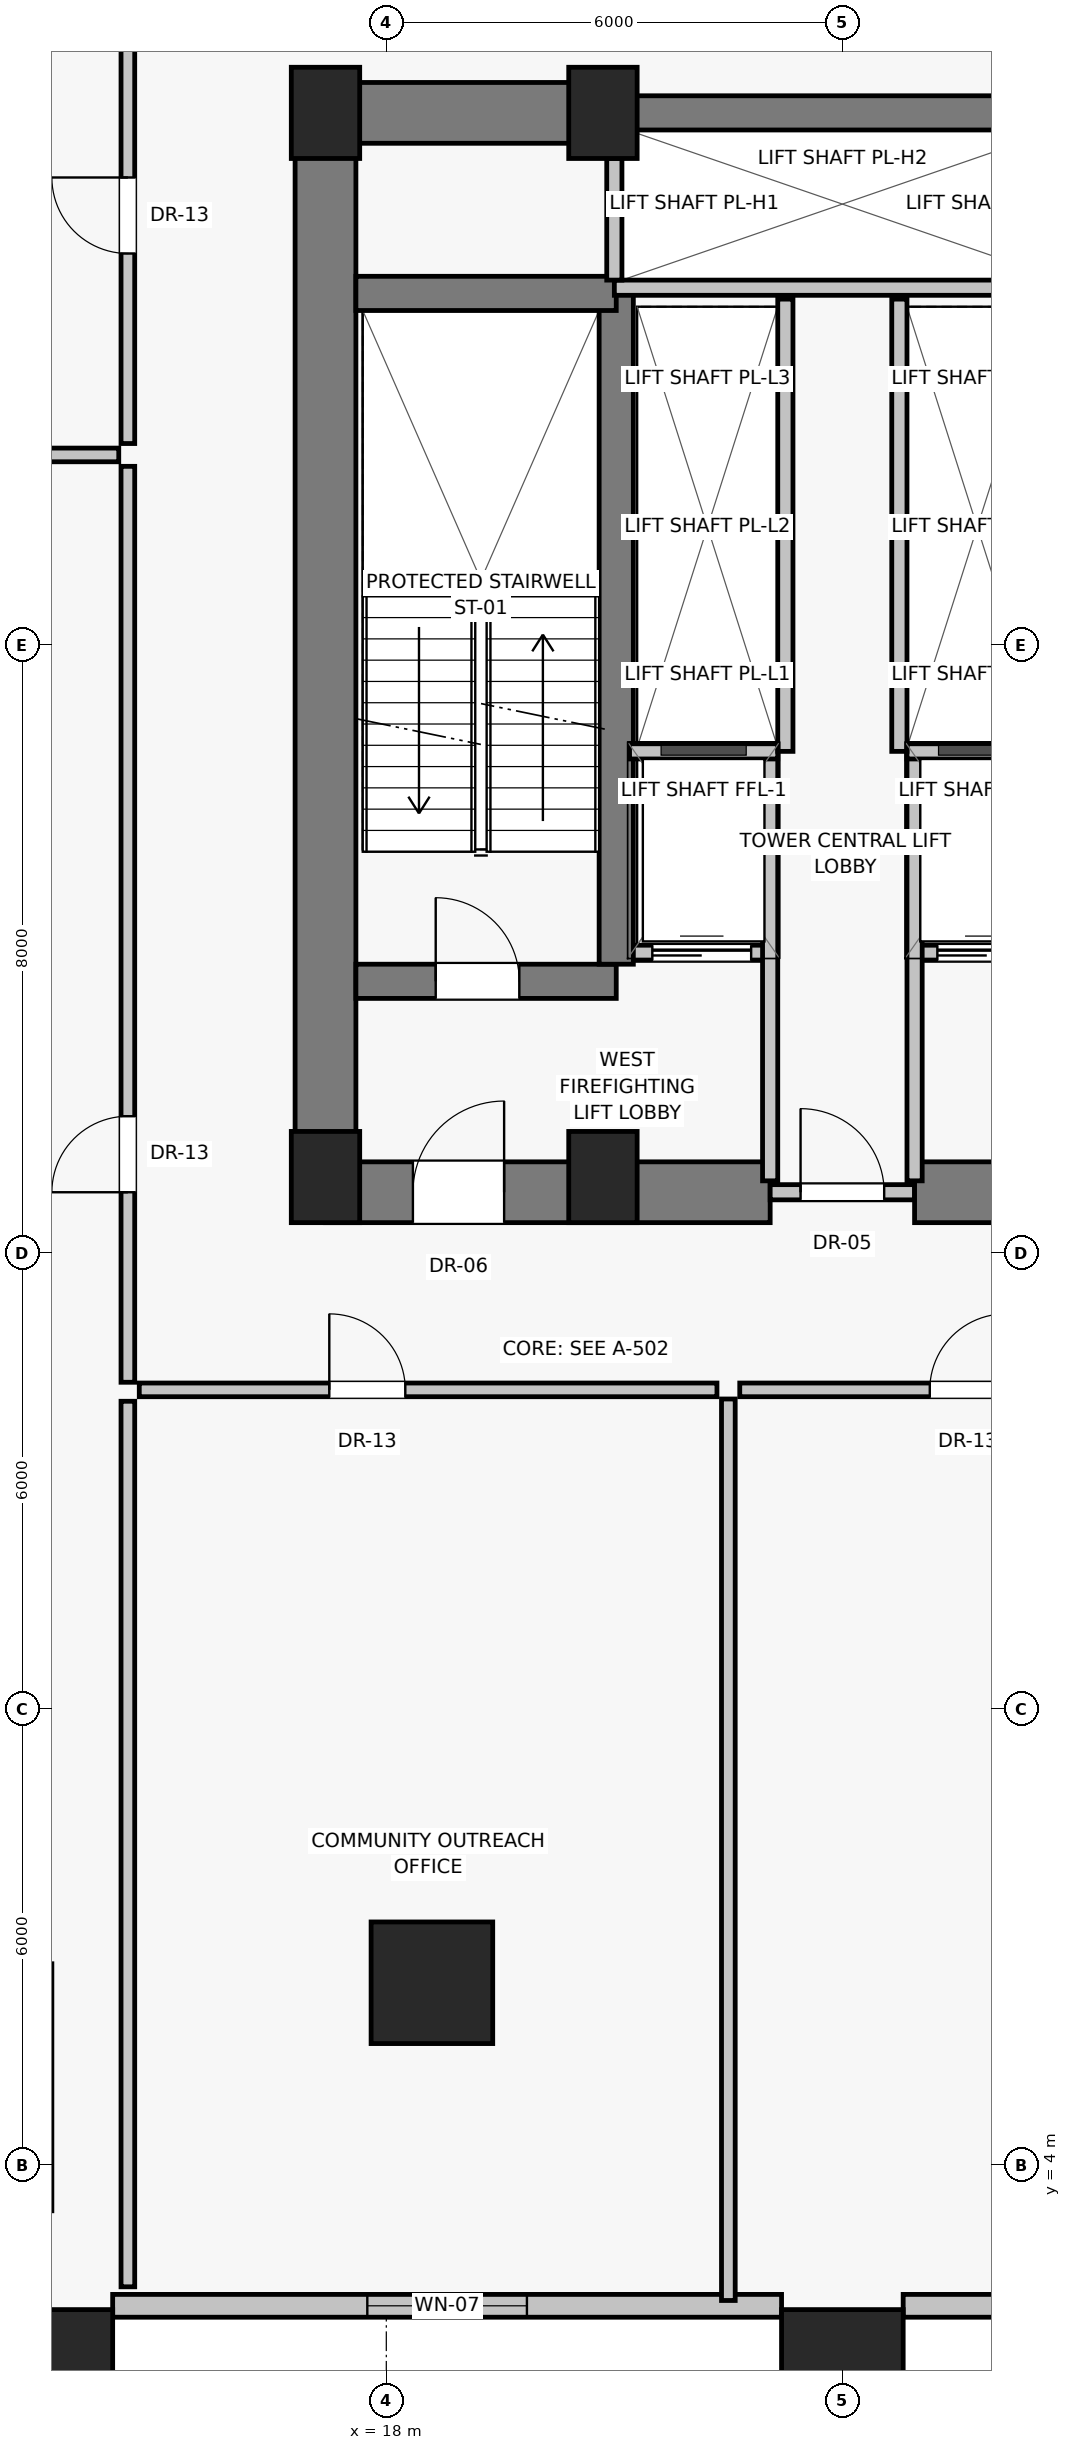
"""IFC4 building model, lengths in metres.
Left out: names, types, materials, properties, quantities, classifications, styles, units other than length and angle.
Written with IfcOpenShell. Run it as: python <this file> out.ifc"""

import sys

from ifc_helpers import new_model, si_unit, direction, frame, frame_2d, origin, origin_2d, place, context, subcontext, project, spatial, rectangle, extrude, source, transform, mapped, element, fill, save


model = new_model("IFC4")
c1 = context("Model", 3, precision=1e-05, world=origin(), true_north=direction((0.0, 1.0)))
c2 = subcontext(c1, "Body", "Model", "MODEL_VIEW")
j1 = project(units=[si_unit("LENGTHUNIT", "METRE"), si_unit("PLANEANGLEUNIT", "RADIAN")], contexts=[c1])
p1 = place(None, origin())
s1 = spatial("IfcSite", under=j1, at=p1, CompositionType="ELEMENT")
p2 = place(p1, origin())
s2 = spatial("IfcBuilding", under=s1, at=p2, CompositionType="ELEMENT")
p3 = place(p2, frame((0.0, 0.0, 14.0)))
s3 = spatial("IfcBuildingStorey", under=s2, at=p3, CompositionType="ELEMENT", Elevation=14.0)
for number, where, z_axis, x_axis in (
    (1, (17.2, 17.0, 0.0), (0.0, 0.0, 1.0), (1.0, 0.0, 0.0)),
    (2, (20.85, 17.0, 0.0), (0.0, 0.0, 1.0), (1.0, 0.0, 0.0)),
    (3, (17.2, 31.0, 0.0), (0.0, 0.0, 1.0), (1.0, 0.0, 0.0)),
    (4, (20.85, 31.0, 0.0), (0.0, 0.0, 1.0), (1.0, 0.0, 0.0)),
):
    element("IfcColumn", number, at=place(p3, frame(where, z_axis=z_axis, x_axis=x_axis)), inside=s3, PredefinedType="PILASTER", context=c2, shape_type="SweptSolid", body=[
        extrude(rectangle(XDim=0.9, YDim=1.2, at=origin_2d()), origin(), (0.0, 0.0, 1.0), 4.4),
    ])
for number, where, z_axis, x_axis in (
    (5, (13.6, 1.3, 0.0), (0.0, 0.0, 1.0), (1.0, 0.0, 0.0)),
    (6, (24.0, 1.3, 0.0), (0.0, 0.0, 1.0), (1.0, 0.0, 0.0)),
    (7, (18.6, 6.4, 0.0), (0.0, 0.0, 1.0), (1.0, 0.0, 0.0)),
):
    element("IfcColumn", number, at=place(p3, frame(where, z_axis=z_axis, x_axis=x_axis)), inside=s3, PredefinedType="COLUMN", context=c2, shape_type="SweptSolid", body=[
        extrude(rectangle(XDim=1.6, YDim=1.6, at=origin_2d()), origin(), (0.0, 0.0, 1.0), 4.4),
    ])
p4 = place(p3, frame((14.4, 2.15, 0.0), z_axis=(0.0, 0.0, 1.0), x_axis=(1.0, 0.0, 0.0)))
e8 = element("IfcWall", 8, at=p4, inside=s3, PredefinedType="SOLIDWALL", context=c2, shape_type="SweptSolid", body=[
    extrude(rectangle(XDim=8.8, YDim=0.3, at=frame_2d((4.4, 0.0))), origin(), (0.0, 0.0, 1.0), 3.0),
])
p5 = place(p4, frame((3.35, 0.0, 0.85)))
e9 = element("IfcOpeningElement", 9, at=p5, cuts=e8, PredefinedType="OPENING", context=c2, shape_type="SweptSolid", body=[
    extrude(rectangle(XDim=2.1, YDim=1.75, at=frame_2d((1.05, 0.875))), frame((0.0, 0.16, 0.0), z_axis=(0.0, -1.0, 0.0), x_axis=(1.0, 0.0, 0.0)), (0.0, 0.0, 1.0), 0.32),
])
p6 = place(p3, frame((24.8, 2.15, 0.0), z_axis=(0.0, 0.0, 1.0), x_axis=(1.0, 0.0, 0.0)))
e10 = element("IfcWall", 10, at=p6, inside=s3, PredefinedType="SOLIDWALL", context=c2, shape_type="SweptSolid", body=[
    extrude(rectangle(XDim=8.8, YDim=0.3, at=frame_2d((4.4, 0.0))), origin(), (0.0, 0.0, 1.0), 3.0),
])
p7 = place(p6, frame((3.35, 0.0, 0.85)))
e11 = element("IfcOpeningElement", 11, at=p7, cuts=e10, PredefinedType="OPENING", context=c2, shape_type="SweptSolid", body=[
    extrude(rectangle(XDim=2.1, YDim=1.75, at=frame_2d((1.05, 0.875))), frame((0.0, 0.16, 0.0), z_axis=(0.0, -1.0, 0.0), x_axis=(1.0, 0.0, 0.0)), (0.0, 0.0, 1.0), 0.32),
])
p8 = place(p3, frame((17.2, 16.8, 0.0), z_axis=(0.0, 0.0, 1.0), x_axis=(0.0, 1.0, 0.0)))
e12 = element("IfcWall", 12, at=p8, inside=s3, PredefinedType="SHEAR", context=c2, shape_type="SweptSolid", body=[
    extrude(rectangle(XDim=14.2, YDim=0.8, at=frame_2d((7.1, 0.0))), origin(), (0.0, 0.0, 1.0), 4.1),
])
p9 = place(p3, frame((17.2, 16.8, 0.0), z_axis=(0.0, 0.0, 1.0), x_axis=(1.0, 0.0, 0.0)))
e13 = element("IfcWall", 13, at=p9, inside=s3, PredefinedType="SHEAR", context=c2, shape_type="SweptSolid", body=[
    extrude(rectangle(XDim=5.85, YDim=0.8, at=frame_2d((2.925, 0.0))), origin(), (0.0, 0.0, 1.0), 4.1),
])
p10 = place(p9, frame((1.15, 0.0, 0.0)))
e14 = element("IfcOpeningElement", 14, at=p10, cuts=e13, PredefinedType="OPENING", context=c2, shape_type="SweptSolid", body=[
    extrude(rectangle(XDim=1.2, YDim=2.03, at=frame_2d((0.6, 1.015))), frame((0.0, 0.41, 0.0), z_axis=(0.0, -1.0, 0.0), x_axis=(1.0, 0.0, 0.0)), (0.0, 0.0, 1.0), 0.82),
])
p11 = place(p3, frame((23.05, 16.8, 0.0), z_axis=(0.0, 0.0, 1.0), x_axis=(1.0, 0.0, 0.0)))
e15 = element("IfcWall", 15, at=p11, inside=s3, PredefinedType="SOLIDWALL", context=c2, shape_type="SweptSolid", body=[
    extrude(rectangle(XDim=1.9, YDim=0.2, at=frame_2d((0.95, 0.0))), origin(), (0.0, 0.0, 1.0), 3.25),
])
p12 = place(p11, frame((0.4, 0.0, 0.0)))
e16 = element("IfcOpeningElement", 16, at=p12, cuts=e15, PredefinedType="OPENING", context=c2, shape_type="SweptSolid", body=[
    extrude(rectangle(XDim=1.1, YDim=2.03, at=frame_2d((0.55, 1.015))), frame((0.0, 0.11, 0.0), z_axis=(0.0, -1.0, 0.0), x_axis=(1.0, 0.0, 0.0)), (0.0, 0.0, 1.0), 0.22),
])
p13 = place(p3, frame((24.95, 16.8, 0.0), z_axis=(0.0, 0.0, 1.0), x_axis=(1.0, 0.0, 0.0)))
e17 = element("IfcWall", 17, at=p13, inside=s3, PredefinedType="SHEAR", context=c2, shape_type="SweptSolid", body=[
    extrude(rectangle(XDim=5.85, YDim=0.8, at=frame_2d((2.925, 0.0))), origin(), (0.0, 0.0, 1.0), 4.1),
])
p14 = place(p13, frame((2.15, 0.0, 0.0)))
e18 = element("IfcOpeningElement", 18, at=p14, cuts=e17, PredefinedType="OPENING", context=c2, shape_type="SweptSolid", body=[
    extrude(rectangle(XDim=1.2, YDim=2.03, at=frame_2d((0.6, 1.015))), frame((0.0, 0.41, 0.0), z_axis=(0.0, -1.0, 0.0), x_axis=(1.0, 0.0, 0.0)), (0.0, 0.0, 1.0), 0.82),
])
p15 = place(p3, frame((17.2, 31.0, 0.0), z_axis=(0.0, 0.0, 1.0), x_axis=(1.0, 0.0, 0.0)))
e19 = element("IfcWall", 19, at=p15, inside=s3, PredefinedType="SHEAR", context=c2, shape_type="SweptSolid", body=[
    extrude(rectangle(XDim=3.8, YDim=0.8, at=frame_2d((1.9, 0.0))), origin(), (0.0, 0.0, 1.0), 4.1),
])
p16 = place(p3, frame((21.0, 31.0, 0.0), z_axis=(0.0, 0.0, 1.0), x_axis=(1.0, 0.0, 0.0)))
e20 = element("IfcWall", 20, at=p16, inside=s3, PredefinedType="SHEAR", context=c2, shape_type="SweptSolid", body=[
    extrude(rectangle(XDim=6.0, YDim=0.45, at=frame_2d((3.0, 0.0))), origin(), (0.0, 0.0, 1.0), 4.1),
])
p17 = place(p3, frame((17.6, 19.575, 0.0), z_axis=(0.0, 0.0, 1.0), x_axis=(1.0, 0.0, 0.0)))
e21 = element("IfcWall", 21, at=p17, inside=s3, PredefinedType="SHEAR", context=c2, shape_type="SweptSolid", body=[
    extrude(rectangle(XDim=3.425, YDim=0.45, at=frame_2d((1.712, 0.0))), origin(), (0.0, 0.0, 1.0), 4.1),
])
p18 = place(p17, frame((1.05, 0.0, 0.0)))
e22 = element("IfcOpeningElement", 22, at=p18, cuts=e21, PredefinedType="OPENING", context=c2, shape_type="SweptSolid", body=[
    extrude(rectangle(XDim=1.1, YDim=2.03, at=frame_2d((0.55, 1.015))), frame((0.0, 0.235, 0.0), z_axis=(0.0, -1.0, 0.0), x_axis=(1.0, 0.0, 0.0)), (0.0, 0.0, 1.0), 0.47),
])
p19 = place(p3, frame((21.2, 19.95, 0.0), z_axis=(0.0, 0.0, 1.0), x_axis=(1.0, 0.0, 0.0)))
e23 = element("IfcWall", 23, at=p19, inside=s3, PredefinedType="SOLIDWALL", context=c2, shape_type="SweptSolid", body=[
    extrude(rectangle(XDim=1.85, YDim=0.2, at=frame_2d((0.925, 0.0))), origin(), (0.0, 0.0, 1.0), 4.1),
])
p20 = place(p19, frame((0.3, 0.0, 0.0)))
e24 = element("IfcOpeningElement", 24, at=p20, cuts=e23, PredefinedType="OPENING", context=c2, shape_type="SweptSolid", body=[
    extrude(rectangle(XDim=1.3, YDim=2.25, at=frame_2d((0.65, 1.125))), frame((0.0, 0.11, 0.0), z_axis=(0.0, -1.0, 0.0), x_axis=(1.0, 0.0, 0.0)), (0.0, 0.0, 1.0), 0.22),
])
p21 = place(p3, frame((24.95, 19.95, 0.0), z_axis=(0.0, 0.0, 1.0), x_axis=(1.0, 0.0, 0.0)))
e25 = element("IfcWall", 25, at=p21, inside=s3, PredefinedType="SOLIDWALL", context=c2, shape_type="SweptSolid", body=[
    extrude(rectangle(XDim=1.85, YDim=0.2, at=frame_2d((0.925, 0.0))), origin(), (0.0, 0.0, 1.0), 4.1),
])
p22 = place(p21, frame((0.3, 0.0, 0.0)))
e26 = element("IfcOpeningElement", 26, at=p22, cuts=e25, PredefinedType="OPENING", context=c2, shape_type="SweptSolid", body=[
    extrude(rectangle(XDim=1.3, YDim=2.25, at=frame_2d((0.65, 1.125))), frame((0.0, 0.11, 0.0), z_axis=(0.0, -1.0, 0.0), x_axis=(1.0, 0.0, 0.0)), (0.0, 0.0, 1.0), 0.22),
])
p23 = place(p3, frame((21.025, 19.8, 0.0), z_axis=(0.0, 0.0, 1.0), x_axis=(0.0, 1.0, 0.0)))
e27 = element("IfcWall", 27, at=p23, inside=s3, PredefinedType="SHEAR", context=c2, shape_type="SweptSolid", body=[
    extrude(rectangle(XDim=8.825, YDim=0.45, at=frame_2d((4.413, 0.0))), origin(), (0.0, 0.0, 1.0), 4.1),
])
p24 = place(p3, frame((17.6, 28.625, 0.0), z_axis=(0.0, 0.0, 1.0), x_axis=(1.0, 0.0, 0.0)))
e28 = element("IfcWall", 28, at=p24, inside=s3, PredefinedType="SHEAR", context=c2, shape_type="SweptSolid", body=[
    extrude(rectangle(XDim=3.425, YDim=0.45, at=frame_2d((1.712, 0.0))), origin(), (0.0, 0.0, 1.0), 4.1),
])
for number, where, z_axis, x_axis in (
    (29, (23.05, 16.95, 0.0), (0.0, 0.0, 1.0), (0.0, 1.0, 0.0)),
    (30, (24.95, 16.95, 0.0), (0.0, 0.0, 1.0), (0.0, 1.0, 0.0)),
):
    element("IfcWall", number, at=place(p3, frame(where, z_axis=z_axis, x_axis=x_axis)), inside=s3, PredefinedType="SOLIDWALL", context=c2, shape_type="SweptSolid", body=[
        extrude(rectangle(XDim=5.6, YDim=0.2, at=frame_2d((2.8, 0.0))), origin(), (0.0, 0.0, 1.0), 4.1),
    ])
for number, where, z_axis, x_axis in (
    (31, (21.2, 22.6, 0.0), (0.0, 0.0, 1.0), (1.0, 0.0, 0.0)),
    (32, (24.85, 22.6, 0.0), (0.0, 0.0, 1.0), (1.0, 0.0, 0.0)),
):
    element("IfcWall", number, at=place(p3, frame(where, z_axis=z_axis, x_axis=x_axis)), inside=s3, PredefinedType="SOLIDWALL", context=c2, shape_type="SweptSolid", body=[
        extrude(rectangle(XDim=1.95, YDim=0.2, at=frame_2d((0.975, 0.0))), origin(), (0.0, 0.0, 1.0), 4.1),
    ])
p25 = place(p3, frame((21.0, 28.7, 0.0), z_axis=(0.0, 0.0, 1.0), x_axis=(1.0, 0.0, 0.0)))
e33 = element("IfcWall", 33, at=p25, inside=s3, PredefinedType="SOLIDWALL", context=c2, shape_type="SweptSolid", body=[
    extrude(rectangle(XDim=6.0, YDim=0.2, at=frame_2d((3.0, 0.0))), origin(), (0.0, 0.0, 1.0), 4.1),
])
p26 = place(p3, frame((21.0, 28.8, 0.0), z_axis=(0.0, 0.0, 1.0), x_axis=(0.0, 1.0, 0.0)))
e34 = element("IfcWall", 34, at=p26, inside=s3, PredefinedType="SOLIDWALL", context=c2, shape_type="SweptSolid", body=[
    extrude(rectangle(XDim=1.6, YDim=0.2, at=frame_2d((0.8, 0.0))), origin(), (0.0, 0.0, 1.0), 4.1),
])
for number, where, z_axis, x_axis in (
    (35, (23.25, 22.6, 0.0), (0.0, 0.0, 1.0), (0.0, 1.0, 0.0)),
    (36, (24.75, 22.6, 0.0), (0.0, 0.0, 1.0), (0.0, 1.0, 0.0)),
):
    element("IfcWall", number, at=place(p3, frame(where, z_axis=z_axis, x_axis=x_axis)), inside=s3, PredefinedType="SOLIDWALL", context=c2, shape_type="SweptSolid", body=[
        extrude(rectangle(XDim=5.95, YDim=0.2, at=frame_2d((2.975, 0.0))), origin(), (0.0, 0.0, 1.0), 4.1),
    ])
p27 = place(p3, frame((14.6, 14.3, 0.0), z_axis=(0.0, 0.0, 1.0), x_axis=(0.0, 1.0, 0.0)))
e37 = element("IfcWall", 37, at=p27, inside=s3, PredefinedType="PARTITIONING", context=c2, shape_type="SweptSolid", body=[
    extrude(rectangle(XDim=12.05, YDim=0.18, at=frame_2d((6.025, 0.0))), origin(), (0.0, 0.0, 1.0), 4.1),
])
p28 = place(p27, frame((2.5, 0.0, 0.0)))
e38 = element("IfcOpeningElement", 38, at=p28, cuts=e37, PredefinedType="OPENING", context=c2, shape_type="SweptSolid", body=[
    extrude(rectangle(XDim=1.0, YDim=2.01, at=frame_2d((0.5, 1.005))), frame((0.0, 0.1, 0.0), z_axis=(0.0, -1.0, 0.0), x_axis=(1.0, 0.0, 0.0)), (0.0, 0.0, 1.0), 0.2),
])
p29 = place(p3, frame((14.6, 26.65, 0.0), z_axis=(0.0, 0.0, 1.0), x_axis=(0.0, 1.0, 0.0)))
e39 = element("IfcWall", 39, at=p29, inside=s3, PredefinedType="PARTITIONING", context=c2, shape_type="SweptSolid", body=[
    extrude(rectangle(XDim=6.85, YDim=0.18, at=frame_2d((3.425, 0.0))), origin(), (0.0, 0.0, 1.0), 4.1),
])
p30 = place(p29, frame((2.5, 0.0, 0.0)))
e40 = element("IfcOpeningElement", 40, at=p30, cuts=e39, PredefinedType="OPENING", context=c2, shape_type="SweptSolid", body=[
    extrude(rectangle(XDim=1.0, YDim=2.01, at=frame_2d((0.5, 1.005))), frame((0.0, 0.1, 0.0), z_axis=(0.0, -1.0, 0.0), x_axis=(1.0, 0.0, 0.0)), (0.0, 0.0, 1.0), 0.2),
])
p31 = place(p3, frame((2.22, 26.5, 0.0), z_axis=(0.0, 0.0, 1.0), x_axis=(1.0, 0.0, 0.0)))
e41 = element("IfcWall", 41, at=p31, inside=s3, PredefinedType="PARTITIONING", context=c2, shape_type="SweptSolid", body=[
    extrude(rectangle(XDim=12.26, YDim=0.18, at=frame_2d((6.13, 0.0))), origin(), (0.0, 0.0, 1.0), 4.1),
])
p32 = place(p3, frame((14.6, 2.4, 0.0), z_axis=(0.0, 0.0, 1.0), x_axis=(0.0, 1.0, 0.0)))
e42 = element("IfcWall", 42, at=p32, inside=s3, PredefinedType="PARTITIONING", context=c2, shape_type="SweptSolid", body=[
    extrude(rectangle(XDim=11.65, YDim=0.18, at=frame_2d((5.825, 0.0))), origin(), (0.0, 0.0, 1.0), 4.1),
])
p33 = place(p3, frame((14.75, 14.2, 0.0), z_axis=(0.0, 0.0, 1.0), x_axis=(1.0, 0.0, 0.0)))
e43 = element("IfcWall", 43, at=p33, inside=s3, PredefinedType="PARTITIONING", context=c2, shape_type="SweptSolid", body=[
    extrude(rectangle(XDim=7.6, YDim=0.18, at=frame_2d((3.8, 0.0))), origin(), (0.0, 0.0, 1.0), 4.1),
])
p34 = place(p33, frame((2.5, 0.0, 0.0)))
e44 = element("IfcOpeningElement", 44, at=p34, cuts=e43, PredefinedType="OPENING", context=c2, shape_type="SweptSolid", body=[
    extrude(rectangle(XDim=1.0, YDim=2.01, at=frame_2d((0.5, 1.005))), frame((0.0, 0.1, 0.0), z_axis=(0.0, -1.0, 0.0), x_axis=(1.0, 0.0, 0.0)), (0.0, 0.0, 1.0), 0.2),
])
p35 = place(p3, frame((22.65, 14.2, 0.0), z_axis=(0.0, 0.0, 1.0), x_axis=(1.0, 0.0, 0.0)))
e45 = element("IfcWall", 45, at=p35, inside=s3, PredefinedType="PARTITIONING", context=c2, shape_type="SweptSolid", body=[
    extrude(rectangle(XDim=10.6, YDim=0.18, at=frame_2d((5.3, 0.0))), origin(), (0.0, 0.0, 1.0), 4.1),
])
p36 = place(p35, frame((2.5, 0.0, 0.0)))
e46 = element("IfcOpeningElement", 46, at=p36, cuts=e45, PredefinedType="OPENING", context=c2, shape_type="SweptSolid", body=[
    extrude(rectangle(XDim=1.0, YDim=2.01, at=frame_2d((0.5, 1.005))), frame((0.0, 0.1, 0.0), z_axis=(0.0, -1.0, 0.0), x_axis=(1.0, 0.0, 0.0)), (0.0, 0.0, 1.0), 0.2),
])
p37 = place(p3, frame((22.5, 2.22, 0.0), z_axis=(0.0, 0.0, 1.0), x_axis=(0.0, 1.0, 0.0)))
e47 = element("IfcWall", 47, at=p37, inside=s3, PredefinedType="PARTITIONING", context=c2, shape_type="SweptSolid", body=[
    extrude(rectangle(XDim=11.86, YDim=0.18, at=frame_2d((5.93, 0.0))), origin(), (0.0, 0.0, 1.0), 4.1),
])
m1 = source(origin(), c2, "Body", "SweptSolid", [
    extrude(rectangle(XDim=2.1, YDim=1.75, at=frame_2d((1.05, 0.875))), frame((0.0, 0.03, 0.0), z_axis=(0.0, -1.0, 0.0), x_axis=(1.0, 0.0, 0.0)), (0.0, 0.0, 1.0), 0.06),
])
p38 = place(p5, origin())
e48 = element("IfcWindow", 48, at=p38, inside=s3, PartitioningType="DOUBLE_PANEL_VERTICAL", PredefinedType="WINDOW", context=c2, shape_type="MappedRepresentation", body=[
    mapped(m1, transform((0.0, 0.0, 0.0), scale=1.0)),
])
fill(e9, e48)
m2 = source(origin(), c2, "Body", "SweptSolid", [
    extrude(rectangle(XDim=1.2, YDim=2.03, at=frame_2d((0.6, 1.015))), frame((0.0, 0.025, 0.0), z_axis=(0.0, -1.0, 0.0), x_axis=(1.0, 0.0, 0.0)), (0.0, 0.0, 1.0), 0.05),
])
p39 = place(p10, origin())
e49 = element("IfcDoor", 49, at=p39, inside=s3, OperationType="SINGLE_SWING_RIGHT", PredefinedType="DOOR", context=c2, shape_type="MappedRepresentation", body=[
    mapped(m2, transform((0.0, 0.0, 0.0), scale=1.0)),
])
fill(e14, e49)
m3 = source(origin(), c2, "Body", "SweptSolid", [
    extrude(rectangle(XDim=1.1, YDim=2.03, at=frame_2d((0.55, 1.015))), frame((0.0, 0.025, 0.0), z_axis=(0.0, -1.0, 0.0), x_axis=(1.0, 0.0, 0.0)), (0.0, 0.0, 1.0), 0.05),
])
p40 = place(p12, origin())
e50 = element("IfcDoor", 50, at=p40, inside=s3, OperationType="SINGLE_SWING_LEFT", PredefinedType="DOOR", context=c2, shape_type="MappedRepresentation", body=[
    mapped(m3, transform((0.0, 0.0, 0.0), scale=1.0)),
])
fill(e16, e50)
p41 = place(p18, origin())
e51 = element("IfcDoor", 51, at=p41, inside=s3, OperationType="SINGLE_SWING_LEFT", PredefinedType="DOOR", context=c2, shape_type="MappedRepresentation", body=[
    mapped(m3, transform((0.0, 0.0, 0.0), scale=1.0)),
])
fill(e22, e51)
m4 = source(origin(), c2, "Body", "SweptSolid", [
    extrude(rectangle(XDim=1.3, YDim=2.25, at=frame_2d((0.65, 1.125))), frame((0.0, 0.025, 0.0), z_axis=(0.0, -1.0, 0.0), x_axis=(1.0, 0.0, 0.0)), (0.0, 0.0, 1.0), 0.05),
])
p42 = place(p20, origin())
e52 = element("IfcDoor", 52, at=p42, inside=s3, OperationType="SLIDING_TO_LEFT", PredefinedType="DOOR", context=c2, shape_type="MappedRepresentation", body=[
    mapped(m4, transform((0.0, 0.0, 0.0), scale=1.0)),
])
fill(e24, e52)
p43 = place(p22, origin())
e53 = element("IfcDoor", 53, at=p43, inside=s3, OperationType="SLIDING_TO_LEFT", PredefinedType="DOOR", context=c2, shape_type="MappedRepresentation", body=[
    mapped(m4, transform((0.0, 0.0, 0.0), scale=1.0)),
])
fill(e26, e53)
m5 = source(origin(), c2, "Body", "SweptSolid", [
    extrude(rectangle(XDim=1.0, YDim=2.01, at=frame_2d((0.5, 1.005))), frame((0.0, 0.025, 0.0), z_axis=(0.0, -1.0, 0.0), x_axis=(1.0, 0.0, 0.0)), (0.0, 0.0, 1.0), 0.05),
])
p44 = place(p28, origin())
e54 = element("IfcDoor", 54, at=p44, inside=s3, OperationType="SINGLE_SWING_LEFT", PredefinedType="DOOR", context=c2, shape_type="MappedRepresentation", body=[
    mapped(m5, transform((0.0, 0.0, 0.0), scale=1.0)),
])
fill(e38, e54)
p45 = place(p30, origin())
e55 = element("IfcDoor", 55, at=p45, inside=s3, OperationType="SINGLE_SWING_RIGHT", PredefinedType="DOOR", context=c2, shape_type="MappedRepresentation", body=[
    mapped(m5, transform((0.0, 0.0, 0.0), scale=1.0)),
])
fill(e40, e55)
p46 = place(p34, origin())
e56 = element("IfcDoor", 56, at=p46, inside=s3, OperationType="SINGLE_SWING_LEFT", PredefinedType="DOOR", context=c2, shape_type="MappedRepresentation", body=[
    mapped(m5, transform((0.0, 0.0, 0.0), scale=1.0)),
])
fill(e44, e56)
p47 = place(p36, origin())
e57 = element("IfcDoor", 57, at=p47, inside=s3, OperationType="SINGLE_SWING_RIGHT", PredefinedType="DOOR", context=c2, shape_type="MappedRepresentation", body=[
    mapped(m5, transform((0.0, 0.0, 0.0), scale=1.0)),
])
fill(e46, e57)
save(model, sys.argv[1])
